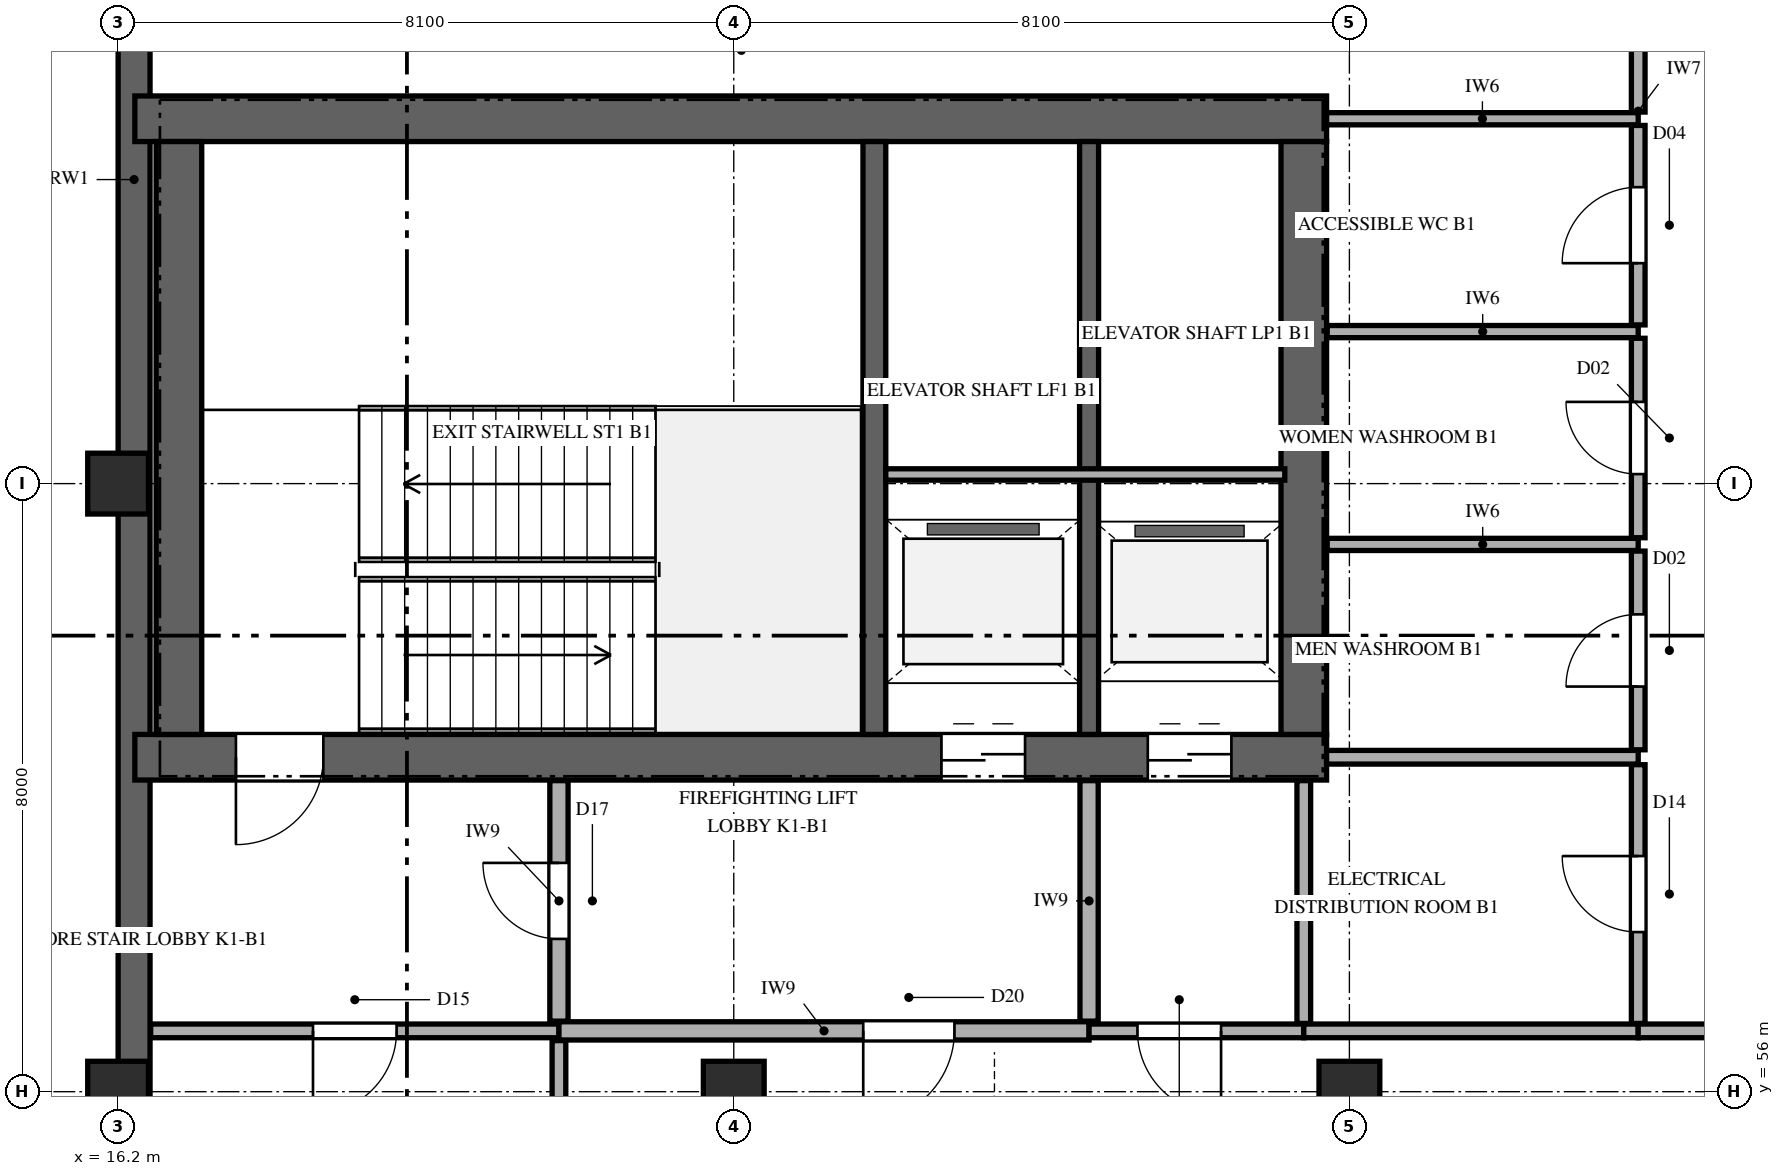
"""IFC4 building model, lengths in metres.
Left out: names, types, materials, properties, quantities, classifications, styles, units other than length and angle.
Written with IfcOpenShell. Run it as: python <this file> out.ifc"""

import sys

from ifc_helpers import new_model, si_unit, direction, frame, frame_2d, origin, origin_2d, place, context, subcontext, project, spatial, rectangle, extrude, element, fill, save


model = new_model("IFC4")
c1 = context("Model", 3, precision=1e-05, world=origin(), true_north=direction((0.0, 1.0)))
c2 = subcontext(c1, "Body", "Model", "MODEL_VIEW")
j1 = project(units=[si_unit("LENGTHUNIT", "METRE"), si_unit("PLANEANGLEUNIT", "RADIAN")], contexts=[c1])
p1 = place(None, origin())
s1 = spatial("IfcSite", under=j1, at=p1, CompositionType="ELEMENT")
p2 = place(p1, origin())
s2 = spatial("IfcBuilding", under=s1, at=p2, CompositionType="ELEMENT")
p3 = place(p2, frame((0.0, 0.0, -4.8)))
s3 = spatial("IfcBuildingStorey", under=s2, at=p3, CompositionType="ELEMENT", Elevation=-4.8)
p4 = place(p3, frame((16.41, 24.21, 0.0), z_axis=(0.0, 0.0, 1.0), x_axis=(0.0, 1.0, 0.0)))
e1 = element("IfcWall", 1, at=p4, inside=s3, PredefinedType="USERDEFINED", context=c2, shape_type="SweptSolid", body=[
    extrude(rectangle(XDim=87.58, YDim=0.42, at=frame_2d((43.79, 0.0))), origin(), (0.0, 0.0, 1.0), 4.45),
])
p5 = place(p3, frame((16.42, 60.4, 0.0), z_axis=(0.0, 0.0, 1.0), x_axis=(1.0, 0.0, 0.0)))
e2 = element("IfcWall", 2, at=p5, inside=s3, PredefinedType="SHEAR", context=c2, shape_type="SweptSolid", body=[
    extrude(rectangle(XDim=15.68, YDim=0.6, at=frame_2d((7.84, 0.0))), origin(), (0.0, 0.0, 1.0), 4.8),
])
p6 = place(p5, frame((1.33, 0.0, 0.0)))
e3 = element("IfcOpeningElement", 3, at=p6, cuts=e2, PredefinedType="OPENING", context=c2, shape_type="SweptSolid", body=[
    extrude(rectangle(XDim=1.15, YDim=2.25, at=frame_2d((0.575, 1.125))), frame((0.0, 0.31, 0.0), z_axis=(0.0, -1.0, 0.0), x_axis=(1.0, 0.0, 0.0)), (0.0, 0.0, 1.0), 0.62),
])
p7 = place(p5, frame((10.613, 0.0, 0.0)))
e4 = element("IfcOpeningElement", 4, at=p7, cuts=e2, PredefinedType="OPENING", context=c2, shape_type="SweptSolid", body=[
    extrude(rectangle(XDim=1.1, YDim=2.2, at=frame_2d((0.55, 1.1))), frame((0.0, 0.31, 0.0), z_axis=(0.0, -1.0, 0.0), x_axis=(1.0, 0.0, 0.0)), (0.0, 0.0, 1.0), 0.62),
])
p8 = place(p5, frame((13.327, 0.0, 0.0)))
e5 = element("IfcOpeningElement", 5, at=p8, cuts=e2, PredefinedType="OPENING", context=c2, shape_type="SweptSolid", body=[
    extrude(rectangle(XDim=1.1, YDim=2.2, at=frame_2d((0.55, 1.1))), frame((0.0, 0.31, 0.0), z_axis=(0.0, -1.0, 0.0), x_axis=(1.0, 0.0, 0.0)), (0.0, 0.0, 1.0), 0.62),
])
p9 = place(p3, frame((16.42, 68.8, 0.0), z_axis=(0.0, 0.0, 1.0), x_axis=(1.0, 0.0, 0.0)))
e6 = element("IfcWall", 6, at=p9, inside=s3, PredefinedType="SHEAR", context=c2, shape_type="SweptSolid", body=[
    extrude(rectangle(XDim=15.68, YDim=0.6, at=frame_2d((7.84, 0.0))), origin(), (0.0, 0.0, 1.0), 4.8),
])
for number, where, z_axis, x_axis in (
    (7, (17.0, 60.7, 0.0), (0.0, 0.0, 1.0), (0.0, 1.0, 0.0)),
    (8, (31.8, 60.7, 0.0), (0.0, 0.0, 1.0), (0.0, 1.0, 0.0)),
):
    element("IfcWall", number, at=place(p3, frame(where, z_axis=z_axis, x_axis=x_axis)), inside=s3, PredefinedType="SHEAR", context=c2, shape_type="SweptSolid", body=[
        extrude(rectangle(XDim=7.8, YDim=0.6, at=frame_2d((3.9, 0.0))), origin(), (0.0, 0.0, 1.0), 4.8),
    ])
p10 = place(p3, frame((26.15, 60.7, 0.0), z_axis=(0.0, 0.0, 1.0), x_axis=(0.0, 1.0, 0.0)))
e9 = element("IfcWall", 9, at=p10, inside=s3, PredefinedType="SHEAR", context=c2, shape_type="SweptSolid", body=[
    extrude(rectangle(XDim=7.8, YDim=0.3, at=frame_2d((3.9, 0.0))), origin(), (0.0, 0.0, 1.0), 4.8),
])
p11 = place(p3, frame((28.975, 60.7, 0.0), z_axis=(0.0, 0.0, 1.0), x_axis=(0.0, 1.0, 0.0)))
e10 = element("IfcWall", 10, at=p11, inside=s3, PredefinedType="SHEAR", context=c2, shape_type="SweptSolid", body=[
    extrude(rectangle(XDim=7.8, YDim=0.25, at=frame_2d((3.9, 0.0))), origin(), (0.0, 0.0, 1.0), 4.8),
])
for number, where, z_axis, x_axis in (
    (11, (16.2, 56.0, 0.0), (0.0, 0.0, 1.0), (1.0, 0.0, 0.0)),
    (12, (16.2, 64.0, 0.0), (0.0, 0.0, 1.0), (1.0, 0.0, 0.0)),
    (13, (24.3, 56.0, 0.0), (0.0, 0.0, 1.0), (1.0, 0.0, 0.0)),
    (14, (32.4, 56.0, 0.0), (0.0, 0.0, 1.0), (1.0, 0.0, 0.0)),
):
    element("IfcColumn", number, at=place(p3, frame(where, z_axis=z_axis, x_axis=x_axis)), inside=s3, PredefinedType="COLUMN", context=c2, shape_type="SweptSolid", body=[
        extrude(rectangle(XDim=0.8, YDim=0.8, at=origin_2d()), origin(), (0.0, 0.0, 1.0), 4.8),
    ])
p12 = place(p3, frame((26.3, 64.12, 0.0), z_axis=(0.0, 0.0, 1.0), x_axis=(1.0, 0.0, 0.0)))
e15 = element("IfcWall", 15, at=p12, inside=s3, PredefinedType="PARTITIONING", context=c2, shape_type="SweptSolid", body=[
    extrude(rectangle(XDim=5.25, YDim=0.15, at=frame_2d((2.625, 0.0))), origin(), (0.0, 0.0, 1.0), 4.45),
])
p13 = place(p3, frame((16.628, 56.8, 0.0), z_axis=(0.0, 0.0, 1.0), x_axis=(1.0, 0.0, 0.0)))
e16 = element("IfcWall", 16, at=p13, inside=s3, PredefinedType="PARTITIONING", context=c2, shape_type="SweptSolid", body=[
    extrude(rectangle(XDim=5.372, YDim=0.18, at=frame_2d((2.686, 0.0))), origin(), (0.0, 0.0, 1.0), 4.45),
])
p14 = place(p13, frame((2.136, 0.0, 0.0)))
e17 = element("IfcOpeningElement", 17, at=p14, cuts=e16, PredefinedType="OPENING", context=c2, shape_type="SweptSolid", body=[
    extrude(rectangle(XDim=1.1, YDim=2.2, at=frame_2d((0.55, 1.1))), frame((0.0, 0.1, 0.0), z_axis=(0.0, -1.0, 0.0), x_axis=(1.0, 0.0, 0.0)), (0.0, 0.0, 1.0), 0.2),
])
p15 = place(p3, frame((22.0, 56.8, 0.0), z_axis=(0.0, 0.0, 1.0), x_axis=(1.0, 0.0, 0.0)))
e18 = element("IfcWall", 18, at=p15, inside=s3, PredefinedType="PARTITIONING", context=c2, shape_type="SweptSolid", body=[
    extrude(rectangle(XDim=6.975, YDim=0.24, at=frame_2d((3.488, 0.0))), origin(), (0.0, 0.0, 1.0), 4.45),
])
p16 = place(p15, frame((4.003, 0.0, 0.0)))
e19 = element("IfcOpeningElement", 19, at=p16, cuts=e18, PredefinedType="OPENING", context=c2, shape_type="SweptSolid", body=[
    extrude(rectangle(XDim=1.2, YDim=2.3, at=frame_2d((0.6, 1.15))), frame((0.0, 0.13, 0.0), z_axis=(0.0, -1.0, 0.0), x_axis=(1.0, 0.0, 0.0)), (0.0, 0.0, 1.0), 0.26),
])
p17 = place(p3, frame((28.975, 56.8, 0.0), z_axis=(0.0, 0.0, 1.0), x_axis=(1.0, 0.0, 0.0)))
e20 = element("IfcWall", 20, at=p17, inside=s3, PredefinedType="PARTITIONING", context=c2, shape_type="SweptSolid", body=[
    extrude(rectangle(XDim=2.825, YDim=0.18, at=frame_2d((1.413, 0.0))), origin(), (0.0, 0.0, 1.0), 4.45),
])
p18 = place(p17, frame((0.636, 0.0, 0.0)))
e21 = element("IfcOpeningElement", 21, at=p18, cuts=e20, PredefinedType="OPENING", context=c2, shape_type="SweptSolid", body=[
    extrude(rectangle(XDim=1.1, YDim=2.2, at=frame_2d((0.55, 1.1))), frame((0.0, 0.1, 0.0), z_axis=(0.0, -1.0, 0.0), x_axis=(1.0, 0.0, 0.0)), (0.0, 0.0, 1.0), 0.2),
])
p19 = place(p3, frame((31.8, 56.8, 0.0), z_axis=(0.0, 0.0, 1.0), x_axis=(1.0, 0.0, 0.0)))
e22 = element("IfcWall", 22, at=p19, inside=s3, PredefinedType="PARTITIONING", context=c2, shape_type="SweptSolid", body=[
    extrude(rectangle(XDim=4.4, YDim=0.18, at=frame_2d((2.2, 0.0))), origin(), (0.0, 0.0, 1.0), 4.45),
])
p20 = place(p3, frame((32.1, 60.4, 0.0), z_axis=(0.0, 0.0, 1.0), x_axis=(1.0, 0.0, 0.0)))
e23 = element("IfcWall", 23, at=p20, inside=s3, PredefinedType="PARTITIONING", context=c2, shape_type="SweptSolid", body=[
    extrude(rectangle(XDim=4.1, YDim=0.18, at=frame_2d((2.05, 0.0))), origin(), (0.0, 0.0, 1.0), 4.45),
])
for number, where, z_axis, x_axis in (
    (24, (32.108, 63.2, 0.0), (0.0, 0.0, 1.0), (1.0, 0.0, 0.0)),
    (25, (32.108, 66.0, 0.0), (0.0, 0.0, 1.0), (1.0, 0.0, 0.0)),
):
    element("IfcWall", number, at=place(p3, frame(where, z_axis=z_axis, x_axis=x_axis)), inside=s3, PredefinedType="PARTITIONING", context=c2, shape_type="SweptSolid", body=[
        extrude(rectangle(XDim=4.092, YDim=0.16, at=frame_2d((2.046, 0.0))), origin(), (0.0, 0.0, 1.0), 4.45),
    ])
p21 = place(p3, frame((32.1, 68.8, 0.0), z_axis=(0.0, 0.0, 1.0), x_axis=(1.0, 0.0, 0.0)))
e26 = element("IfcWall", 26, at=p21, inside=s3, PredefinedType="PARTITIONING", context=c2, shape_type="SweptSolid", body=[
    extrude(rectangle(XDim=4.1, YDim=0.16, at=frame_2d((2.05, 0.0))), origin(), (0.0, 0.0, 1.0), 4.45),
])
p22 = place(p3, frame((36.2, 56.8, 0.0), z_axis=(0.0, 0.0, 1.0), x_axis=(1.0, 0.0, 0.0)))
e27 = element("IfcWall", 27, at=p22, inside=s3, PredefinedType="PARTITIONING", context=c2, shape_type="SweptSolid", body=[
    extrude(rectangle(XDim=4.3, YDim=0.18, at=frame_2d((2.15, 0.0))), origin(), (0.0, 0.0, 1.0), 4.45),
])
p23 = place(p3, frame((22.0, 51.347, 0.0), z_axis=(0.0, 0.0, 1.0), x_axis=(0.0, 1.0, 0.0)))
e28 = element("IfcWall", 28, at=p23, inside=s3, PredefinedType="PARTITIONING", context=c2, shape_type="SweptSolid", body=[
    extrude(rectangle(XDim=5.325, YDim=0.18, at=frame_2d((2.662, 0.0))), origin(), (0.0, 0.0, 1.0), 4.45),
])
p24 = place(p3, frame((22.0, 56.928, 0.0), z_axis=(0.0, 0.0, 1.0), x_axis=(0.0, 1.0, 0.0)))
e29 = element("IfcWall", 29, at=p24, inside=s3, PredefinedType="PARTITIONING", context=c2, shape_type="SweptSolid", body=[
    extrude(rectangle(XDim=3.164, YDim=0.24, at=frame_2d((1.582, 0.0))), origin(), (0.0, 0.0, 1.0), 4.45),
])
p25 = place(p24, frame((1.082, 0.0, 0.0)))
e30 = element("IfcOpeningElement", 30, at=p25, cuts=e29, PredefinedType="OPENING", context=c2, shape_type="SweptSolid", body=[
    extrude(rectangle(XDim=1.0, YDim=2.2, at=frame_2d((0.5, 1.1))), frame((0.0, 0.13, 0.0), z_axis=(0.0, -1.0, 0.0), x_axis=(1.0, 0.0, 0.0)), (0.0, 0.0, 1.0), 0.26),
])
p26 = place(p3, frame((28.975, 56.928, 0.0), z_axis=(0.0, 0.0, 1.0), x_axis=(0.0, 1.0, 0.0)))
e31 = element("IfcWall", 31, at=p26, inside=s3, PredefinedType="PARTITIONING", context=c2, shape_type="SweptSolid", body=[
    extrude(rectangle(XDim=3.164, YDim=0.24, at=frame_2d((1.582, 0.0))), origin(), (0.0, 0.0, 1.0), 4.45),
])
p27 = place(p3, frame((31.8, 56.898, 0.0), z_axis=(0.0, 0.0, 1.0), x_axis=(0.0, 1.0, 0.0)))
e32 = element("IfcWall", 32, at=p27, inside=s3, PredefinedType="PARTITIONING", context=c2, shape_type="SweptSolid", body=[
    extrude(rectangle(XDim=3.194, YDim=0.18, at=frame_2d((1.597, 0.0))), origin(), (0.0, 0.0, 1.0), 4.45),
])
p28 = place(p3, frame((36.2, 56.898, 0.0), z_axis=(0.0, 0.0, 1.0), x_axis=(0.0, 1.0, 0.0)))
e33 = element("IfcWall", 33, at=p28, inside=s3, PredefinedType="PARTITIONING", context=c2, shape_type="SweptSolid", body=[
    extrude(rectangle(XDim=3.404, YDim=0.18, at=frame_2d((1.702, 0.0))), origin(), (0.0, 0.0, 1.0), 4.45),
])
p29 = place(p28, frame((1.202, 0.0, 0.0)))
e34 = element("IfcOpeningElement", 34, at=p29, cuts=e33, PredefinedType="OPENING", context=c2, shape_type="SweptSolid", body=[
    extrude(rectangle(XDim=1.0, YDim=2.15, at=frame_2d((0.5, 1.075))), frame((0.0, 0.1, 0.0), z_axis=(0.0, -1.0, 0.0), x_axis=(1.0, 0.0, 0.0)), (0.0, 0.0, 1.0), 0.2),
])
p30 = place(p3, frame((36.2, 60.498, 0.0), z_axis=(0.0, 0.0, 1.0), x_axis=(0.0, 1.0, 0.0)))
e35 = element("IfcWall", 35, at=p30, inside=s3, PredefinedType="PARTITIONING", context=c2, shape_type="SweptSolid", body=[
    extrude(rectangle(XDim=2.614, YDim=0.18, at=frame_2d((1.307, 0.0))), origin(), (0.0, 0.0, 1.0), 4.45),
])
p31 = place(p30, frame((0.832, 0.0, 0.0)))
e36 = element("IfcOpeningElement", 36, at=p31, cuts=e35, PredefinedType="OPENING", context=c2, shape_type="SweptSolid", body=[
    extrude(rectangle(XDim=0.95, YDim=2.1, at=frame_2d((0.475, 1.05))), frame((0.0, 0.1, 0.0), z_axis=(0.0, -1.0, 0.0), x_axis=(1.0, 0.0, 0.0)), (0.0, 0.0, 1.0), 0.2),
])
p32 = place(p3, frame((36.2, 63.288, 0.0), z_axis=(0.0, 0.0, 1.0), x_axis=(0.0, 1.0, 0.0)))
e37 = element("IfcWall", 37, at=p32, inside=s3, PredefinedType="PARTITIONING", context=c2, shape_type="SweptSolid", body=[
    extrude(rectangle(XDim=2.624, YDim=0.18, at=frame_2d((1.312, 0.0))), origin(), (0.0, 0.0, 1.0), 4.45),
])
p33 = place(p32, frame((0.837, 0.0, 0.0)))
e38 = element("IfcOpeningElement", 38, at=p33, cuts=e37, PredefinedType="OPENING", context=c2, shape_type="SweptSolid", body=[
    extrude(rectangle(XDim=0.95, YDim=2.1, at=frame_2d((0.475, 1.05))), frame((0.0, 0.1, 0.0), z_axis=(0.0, -1.0, 0.0), x_axis=(1.0, 0.0, 0.0)), (0.0, 0.0, 1.0), 0.2),
])
p34 = place(p3, frame((36.2, 66.088, 0.0), z_axis=(0.0, 0.0, 1.0), x_axis=(0.0, 1.0, 0.0)))
e39 = element("IfcWall", 39, at=p34, inside=s3, PredefinedType="PARTITIONING", context=c2, shape_type="SweptSolid", body=[
    extrude(rectangle(XDim=2.624, YDim=0.18, at=frame_2d((1.312, 0.0))), origin(), (0.0, 0.0, 1.0), 4.45),
])
p35 = place(p34, frame((0.812, 0.0, 0.0)))
e40 = element("IfcOpeningElement", 40, at=p35, cuts=e39, PredefinedType="OPENING", context=c2, shape_type="SweptSolid", body=[
    extrude(rectangle(XDim=1.0, YDim=2.15, at=frame_2d((0.5, 1.075))), frame((0.0, 0.1, 0.0), z_axis=(0.0, -1.0, 0.0), x_axis=(1.0, 0.0, 0.0)), (0.0, 0.0, 1.0), 0.2),
])
p36 = place(p3, frame((36.2, 68.888, 0.0), z_axis=(0.0, 0.0, 1.0), x_axis=(0.0, 1.0, 0.0)))
e41 = element("IfcWall", 41, at=p36, inside=s3, PredefinedType="PARTITIONING", context=c2, shape_type="SweptSolid", body=[
    extrude(rectangle(XDim=6.007, YDim=0.18, at=frame_2d((3.003, 0.0))), origin(), (0.0, 0.0, 1.0), 4.035),
])
p37 = place(p6, frame((1.15, 0.0, 0.0), z_axis=(0.0, 0.0, 1.0), x_axis=(-1.0, 0.0, 0.0)))
e42 = element("IfcDoor", 42, at=p37, inside=s3, OperationType="SINGLE_SWING_LEFT", PredefinedType="DOOR", context=c2, shape_type="SweptSolid", body=[
    extrude(rectangle(XDim=1.15, YDim=2.25, at=frame_2d((0.575, 1.125))), frame((0.0, 0.025, 0.0), z_axis=(0.0, -1.0, 0.0), x_axis=(1.0, 0.0, 0.0)), (0.0, 0.0, 1.0), 0.05),
])
fill(e3, e42)
p38 = place(p7, frame((1.1, 0.0, 0.0), z_axis=(0.0, 0.0, 1.0), x_axis=(-1.0, 0.0, 0.0)))
e43 = element("IfcDoor", 43, at=p38, inside=s3, OperationType="DOUBLE_DOOR_SLIDING", PredefinedType="DOOR", context=c2, shape_type="SweptSolid", body=[
    extrude(rectangle(XDim=1.1, YDim=2.2, at=frame_2d((0.55, 1.1))), frame((0.0, 0.025, 0.0), z_axis=(0.0, -1.0, 0.0), x_axis=(1.0, 0.0, 0.0)), (0.0, 0.0, 1.0), 0.05),
])
fill(e4, e43)
p39 = place(p8, frame((1.1, 0.0, 0.0), z_axis=(0.0, 0.0, 1.0), x_axis=(-1.0, 0.0, 0.0)))
e44 = element("IfcDoor", 44, at=p39, inside=s3, OperationType="DOUBLE_DOOR_SLIDING", PredefinedType="DOOR", context=c2, shape_type="SweptSolid", body=[
    extrude(rectangle(XDim=1.1, YDim=2.2, at=frame_2d((0.55, 1.1))), frame((0.0, 0.025, 0.0), z_axis=(0.0, -1.0, 0.0), x_axis=(1.0, 0.0, 0.0)), (0.0, 0.0, 1.0), 0.05),
])
fill(e5, e44)
p40 = place(p14, frame((1.1, 0.0, 0.0), z_axis=(0.0, 0.0, 1.0), x_axis=(-1.0, 0.0, 0.0)))
e45 = element("IfcDoor", 45, at=p40, inside=s3, OperationType="SINGLE_SWING_LEFT", PredefinedType="DOOR", context=c2, shape_type="SweptSolid", body=[
    extrude(rectangle(XDim=1.1, YDim=2.2, at=frame_2d((0.55, 1.1))), frame((0.0, 0.025, 0.0), z_axis=(0.0, -1.0, 0.0), x_axis=(1.0, 0.0, 0.0)), (0.0, 0.0, 1.0), 0.05),
])
fill(e17, e45)
p41 = place(p16, frame((1.2, 0.0, 0.0), z_axis=(0.0, 0.0, 1.0), x_axis=(-1.0, 0.0, 0.0)))
e46 = element("IfcDoor", 46, at=p41, inside=s3, OperationType="SINGLE_SWING_LEFT", PredefinedType="DOOR", context=c2, shape_type="SweptSolid", body=[
    extrude(rectangle(XDim=1.2, YDim=2.3, at=frame_2d((0.6, 1.15))), frame((0.0, 0.025, 0.0), z_axis=(0.0, -1.0, 0.0), x_axis=(1.0, 0.0, 0.0)), (0.0, 0.0, 1.0), 0.05),
])
fill(e19, e46)
p42 = place(p18, frame((1.1, 0.0, 0.0), z_axis=(0.0, 0.0, 1.0), x_axis=(-1.0, 0.0, 0.0)))
e47 = element("IfcDoor", 47, at=p42, inside=s3, OperationType="SINGLE_SWING_RIGHT", PredefinedType="DOOR", context=c2, shape_type="SweptSolid", body=[
    extrude(rectangle(XDim=1.1, YDim=2.2, at=frame_2d((0.55, 1.1))), frame((0.0, 0.025, 0.0), z_axis=(0.0, -1.0, 0.0), x_axis=(1.0, 0.0, 0.0)), (0.0, 0.0, 1.0), 0.05),
])
fill(e21, e47)
p43 = place(p25, origin())
e48 = element("IfcDoor", 48, at=p43, inside=s3, OperationType="SINGLE_SWING_RIGHT", PredefinedType="DOOR", context=c2, shape_type="SweptSolid", body=[
    extrude(rectangle(XDim=1.0, YDim=2.2, at=frame_2d((0.5, 1.1))), frame((0.0, 0.025, 0.0), z_axis=(0.0, -1.0, 0.0), x_axis=(1.0, 0.0, 0.0)), (0.0, 0.0, 1.0), 0.05),
])
fill(e30, e48)
p44 = place(p29, origin())
e49 = element("IfcDoor", 49, at=p44, inside=s3, OperationType="SINGLE_SWING_RIGHT", PredefinedType="DOOR", context=c2, shape_type="SweptSolid", body=[
    extrude(rectangle(XDim=1.0, YDim=2.15, at=frame_2d((0.5, 1.075))), frame((0.0, 0.025, 0.0), z_axis=(0.0, -1.0, 0.0), x_axis=(1.0, 0.0, 0.0)), (0.0, 0.0, 1.0), 0.05),
])
fill(e34, e49)
p45 = place(p31, origin())
e50 = element("IfcDoor", 50, at=p45, inside=s3, OperationType="SINGLE_SWING_LEFT", PredefinedType="DOOR", context=c2, shape_type="SweptSolid", body=[
    extrude(rectangle(XDim=0.95, YDim=2.1, at=frame_2d((0.475, 1.05))), frame((0.0, 0.025, 0.0), z_axis=(0.0, -1.0, 0.0), x_axis=(1.0, 0.0, 0.0)), (0.0, 0.0, 1.0), 0.05),
])
fill(e36, e50)
p46 = place(p33, origin())
e51 = element("IfcDoor", 51, at=p46, inside=s3, OperationType="SINGLE_SWING_RIGHT", PredefinedType="DOOR", context=c2, shape_type="SweptSolid", body=[
    extrude(rectangle(XDim=0.95, YDim=2.1, at=frame_2d((0.475, 1.05))), frame((0.0, 0.025, 0.0), z_axis=(0.0, -1.0, 0.0), x_axis=(1.0, 0.0, 0.0)), (0.0, 0.0, 1.0), 0.05),
])
fill(e38, e51)
p47 = place(p35, origin())
e52 = element("IfcDoor", 52, at=p47, inside=s3, OperationType="SINGLE_SWING_LEFT", PredefinedType="DOOR", context=c2, shape_type="SweptSolid", body=[
    extrude(rectangle(XDim=1.0, YDim=2.15, at=frame_2d((0.5, 1.075))), frame((0.0, 0.025, 0.0), z_axis=(0.0, -1.0, 0.0), x_axis=(1.0, 0.0, 0.0)), (0.0, 0.0, 1.0), 0.05),
])
fill(e40, e52)
save(model, sys.argv[1])
